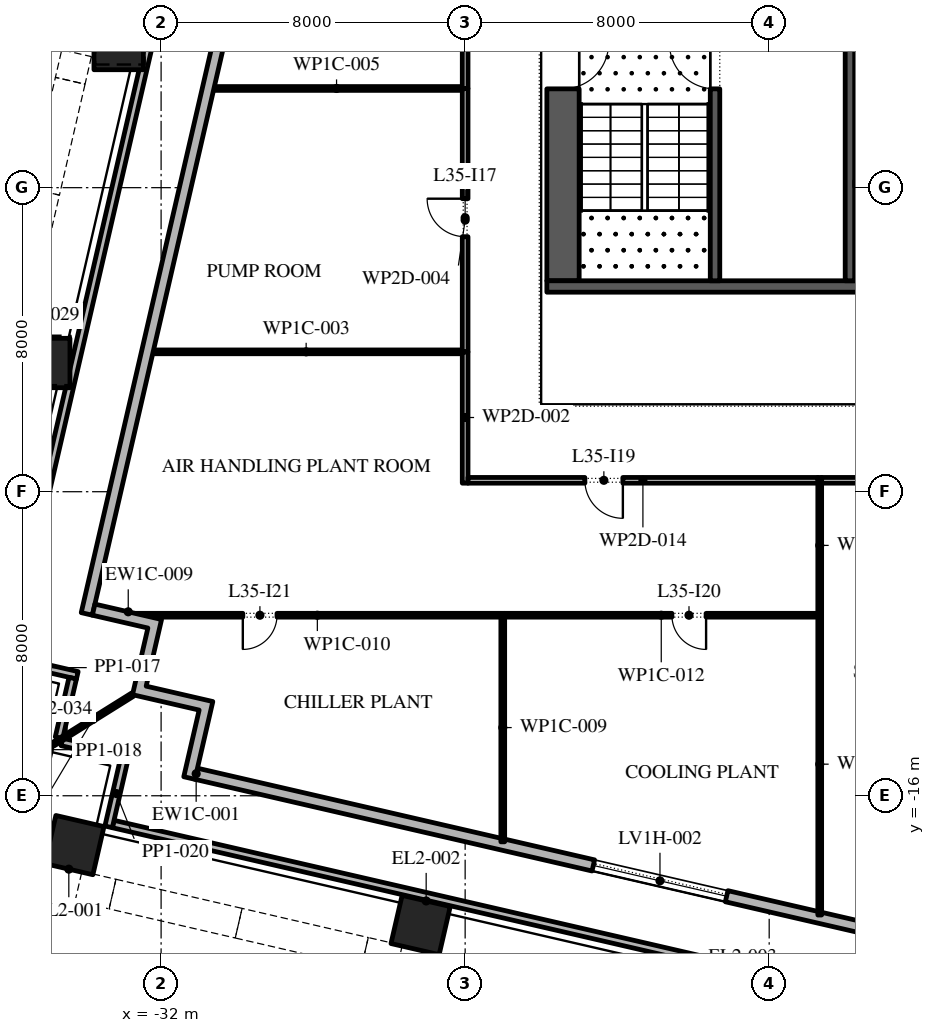
"""IFC4 building model, lengths in metres.
Left out: names, types, materials, properties, quantities, classifications, styles, units other than length and angle.
Written with IfcOpenShell. Run it as: python <this file> out.ifc"""

import sys

from ifc_helpers import new_model, si_unit, direction, frame, frame_2d, origin, origin_2d, place, context, subcontext, project, spatial, polyline, rectangle, outline, extrude, element, fill, save


model = new_model("IFC4")
c1 = context("Model", 3, precision=1e-05, world=origin(), true_north=direction((0.0, 1.0)))
c2 = subcontext(c1, "Body", "Model", "MODEL_VIEW")
j1 = project(units=[si_unit("LENGTHUNIT", "METRE"), si_unit("PLANEANGLEUNIT", "RADIAN")], contexts=[c1])
p1 = place(None, origin())
s1 = spatial("IfcSite", under=j1, at=p1, CompositionType="ELEMENT")
p2 = place(p1, origin())
s2 = spatial("IfcBuilding", under=s1, at=p2, CompositionType="ELEMENT")
p3 = place(p2, frame((0.0, 0.0, 160.2)))
s3 = spatial("IfcBuildingStorey", under=s2, at=p3, CompositionType="ELEMENT", Elevation=160.2)
for number, where, z_axis, x_axis in (
    (1, (-34.282, -17.298, 0.0), (0.0, 0.0, 1.0), (0.974, -0.225, 0.0)),
    (2, (-25.172, -19.402, 0.0), (0.0, 0.0, 1.0), (0.974, -0.225, 0.0)),
):
    element("IfcColumn", number, at=place(p3, frame(where, z_axis=z_axis, x_axis=x_axis)), inside=s3, PredefinedType="COLUMN", context=c2, shape_type="SweptSolid", body=[
        extrude(rectangle(XDim=1.3, YDim=1.3, at=origin_2d()), origin(), (0.0, 0.0, 1.0), 5.4),
    ])
p4 = place(p3, frame((-33.117, 3.753, 0.0), z_axis=(0.005830129404, 0.025263894082, 0.999663816114), x_axis=(-0.974391195695, 0.224859506699, 0.0)))
e3 = element("IfcColumn", 3, at=p4, inside=s3, PredefinedType="COLUMN", context=c2, shape_type="SweptSolid", body=[
    extrude(rectangle(XDim=1.3, YDim=1.3, at=origin_2d()), origin(), (0.0, 0.0, 1.0), 5.402),
])
p5 = place(p3, frame((-35.048, -4.614, 0.0), z_axis=(0.00293840192, 0.012657731347, 0.999915570251), x_axis=(-0.974097200243, 0.226129707199, 0.0)))
e4 = element("IfcColumn", 4, at=p5, inside=s3, PredefinedType="COLUMN", context=c2, shape_type="SweptSolid", body=[
    extrude(rectangle(XDim=1.3, YDim=1.3, at=origin_2d()), origin(), (0.0, 0.0, 1.0), 5.401),
])
p6 = place(p3, frame((-35.631, -15.139, 0.0), z_axis=(0.0, 0.0, 1.0), x_axis=(0.974370064785, -0.224951054344, 0.0)))
e5 = element("IfcColumn", 5, at=p6, inside=s3, PredefinedType="COLUMN", context=c2, shape_type="SweptSolid", body=[
    extrude(rectangle(XDim=1.3, YDim=1.3, at=origin_2d()), origin(), (0.0, 0.0, 1.0), 5.4),
])
p7 = place(p3, frame((-31.078, -15.421, 0.0), z_axis=(0.0, 0.0, 1.0), x_axis=(0.974370456532, -0.224949357493, 0.0)))
e6 = element("IfcWall", 6, at=p7, inside=s3, PredefinedType="STANDARD", context=c2, shape_type="SweptSolid", body=[
    extrude(rectangle(XDim=51.0, YDim=0.3, at=frame_2d((25.5, 0.0))), origin(), (0.0, 0.0, 1.0), 4.95),
])
p8 = place(p7, frame((10.725, 0.0, 0.6)))
e7 = element("IfcOpeningElement", 7, at=p8, cuts=e6, PredefinedType="OPENING", context=c2, shape_type="SweptSolid", body=[
    extrude(rectangle(XDim=3.6, YDim=3.25, at=frame_2d((1.8, 1.625))), frame((0.0, 0.16, 0.0), z_axis=(0.0, -1.0, 0.0), x_axis=(1.0, 0.0, 0.0)), (0.0, 0.0, 1.0), 0.32),
])
p9 = place(p7, frame((44.925, 0.0, 0.6)))
e8 = element("IfcOpeningElement", 8, at=p9, cuts=e6, PredefinedType="OPENING", context=c2, shape_type="SweptSolid", body=[
    extrude(rectangle(XDim=3.6, YDim=3.9, at=frame_2d((1.8, 1.95))), frame((0.0, 0.16, 0.0), z_axis=(0.0, -1.0, 0.0), x_axis=(1.0, 0.0, 0.0)), (0.0, 0.0, 1.0), 0.32),
])
p10 = place(p3, origin())
e9 = element("IfcWall", 9, at=p10, inside=s3, PredefinedType="STANDARD", context=c2, shape_type="SweptSolid", body=[
    extrude(outline(polyline([(-32.393, -13.116), (-30.639, -13.521), (-31.111, -15.567), (-31.404, -15.5), (-30.999, -13.746), (-32.753, -13.341), (-32.348, -11.587), (-33.809, -11.25), (-33.742, -10.957), (-31.988, -11.362), (-32.393, -13.116)])), origin(), (0.0, 0.0, 1.0), 4.95),
])
p11 = place(p3, frame((-33.261, -16.744, -0.05), z_axis=(0.0, 0.0, 1.0), x_axis=(0.974370602864, -0.224948723658, 0.0)))
e10 = element("IfcWall", 10, at=p11, inside=s3, PredefinedType="STANDARD", context=c2, shape_type="SweptSolid", body=[
    extrude(rectangle(XDim=54.56, YDim=0.2, at=frame_2d((27.28, 0.0))), origin(), (0.0, 0.0, 1.0), 1.1),
])
p12 = place(p3, frame((-22.904, 44.567, -0.05), z_axis=(0.0, 0.0, 1.0), x_axis=(-0.224953271822, -0.974369552837, 0.0)))
e11 = element("IfcWall", 11, at=p12, inside=s3, PredefinedType="STANDARD", context=c2, shape_type="SweptSolid", body=[
    extrude(rectangle(XDim=58.569, YDim=0.2, at=frame_2d((29.285, 0.0))), origin(), (0.0, 0.0, 1.0), 1.1),
])
p13 = place(p3, frame((-35.959, -12.426, -0.05), z_axis=(0.0, 0.0, 1.0), x_axis=(0.974356896201, -0.225008086135, 0.0)))
e12 = element("IfcWall", 12, at=p13, inside=s3, PredefinedType="STANDARD", context=c2, shape_type="SweptSolid", body=[
    extrude(rectangle(XDim=1.8, YDim=0.2, at=frame_2d((0.9, 0.0))), origin(), (0.0, 0.0, 1.0), 1.1),
])
p14 = place(p3, frame((-34.325, -12.906, -0.05), z_axis=(0.0, 0.0, 1.0), x_axis=(-0.224992557564, -0.974360482081, 0.0)))
e13 = element("IfcWall", 13, at=p14, inside=s3, PredefinedType="STANDARD", context=c2, shape_type="SweptSolid", body=[
    extrude(rectangle(XDim=1.608, YDim=0.2, at=frame_2d((0.804, 0.0))), origin(), (0.0, 0.0, 1.0), 1.1),
])
for number, where, z_axis, x_axis in (
    (14, (-34.61, -14.585, -0.05), (0.0, 0.0, 1.0), (0.974, -0.225, 0.0)),
    (15, (-32.976, -15.065, -0.05), (0.0, 0.0, 1.0), (-0.225, -0.974, 0.0)),
):
    element("IfcWall", number, at=place(p3, frame(where, z_axis=z_axis, x_axis=x_axis)), inside=s3, PredefinedType="STANDARD", context=c2, shape_type="SweptSolid", body=[
        extrude(rectangle(XDim=1.8, YDim=0.2, at=frame_2d((0.9, 0.0))), origin(), (0.0, 0.0, 1.0), 1.1),
    ])
p15 = place(p3, frame((-32.753, -13.341, -0.05), z_axis=(0.0, 0.0, 1.0), x_axis=(-0.848059759764, -0.529900598103, 0.0)))
e16 = element("IfcWall", 16, at=p15, inside=s3, PredefinedType="STANDARD", context=c2, shape_type="SweptSolid", body=[
    extrude(rectangle(XDim=2.455, YDim=0.1, at=frame_2d((1.228, 0.0))), origin(), (0.0, 0.0, 1.0), 5.0),
])
p16 = place(p3, frame((-21.425, -2.45, 0.0), z_axis=(0.0, 0.0, 1.0), x_axis=(0.0, 1.0, 0.0)))
e17 = element("IfcWall", 17, at=p16, inside=s3, PredefinedType="SHEAR", context=c2, shape_type="SweptSolid", body=[
    extrude(rectangle(XDim=27.9, YDim=0.85, at=frame_2d((13.95, 0.0))), origin(), (0.0, 0.0, 1.0), 4.95),
])
p17 = place(p16, frame((5.05, 0.0, 0.0)))
e18 = element("IfcOpeningElement", 18, at=p17, cuts=e17, PredefinedType="OPENING", context=c2, shape_type="SweptSolid", body=[
    extrude(rectangle(XDim=1.2, YDim=2.1, at=frame_2d((0.6, 1.05))), frame((0.0, 0.435, 0.0), z_axis=(0.0, -1.0, 0.0), x_axis=(1.0, 0.0, 0.0)), (0.0, 0.0, 1.0), 0.87),
])
p18 = place(p16, frame((21.65, 0.0, 0.0)))
e19 = element("IfcOpeningElement", 19, at=p18, cuts=e17, PredefinedType="OPENING", context=c2, shape_type="SweptSolid", body=[
    extrude(rectangle(XDim=1.2, YDim=2.1, at=frame_2d((0.6, 1.05))), frame((0.0, 0.435, 0.0), z_axis=(0.0, -1.0, 0.0), x_axis=(1.0, 0.0, 0.0)), (0.0, 0.0, 1.0), 0.87),
])
p19 = place(p3, frame((-21.85, -2.6, 0.0), z_axis=(0.0, 0.0, 1.0), x_axis=(1.0, 0.0, 0.0)))
e20 = element("IfcWall", 20, at=p19, inside=s3, PredefinedType="SHEAR", context=c2, shape_type="SweptSolid", body=[
    extrude(rectangle(XDim=11.7, YDim=0.3, at=frame_2d((5.85, 0.0))), origin(), (0.0, 0.0, 1.0), 4.95),
])
p20 = place(p3, frame((-17.425, -2.45, 0.0), z_axis=(0.0, 0.0, 1.0), x_axis=(0.0, 1.0, 0.0)))
e21 = element("IfcWall", 21, at=p20, inside=s3, PredefinedType="SHEAR", context=c2, shape_type="SweptSolid", body=[
    extrude(rectangle(XDim=6.3, YDim=0.25, at=frame_2d((3.15, 0.0))), origin(), (0.0, 0.0, 1.0), 4.95),
])
p21 = place(p20, frame((5.05, 0.0, 0.0)))
e22 = element("IfcOpeningElement", 22, at=p21, cuts=e21, PredefinedType="OPENING", context=c2, shape_type="SweptSolid", body=[
    extrude(rectangle(XDim=1.2, YDim=2.1, at=frame_2d((0.6, 1.05))), frame((0.0, 0.135, 0.0), z_axis=(0.0, -1.0, 0.0), x_axis=(1.0, 0.0, 0.0)), (0.0, 0.0, 1.0), 0.27),
])
p22 = place(p3, frame((-13.875, -2.45, 0.0), z_axis=(0.0, 0.0, 1.0), x_axis=(0.0, 1.0, 0.0)))
e23 = element("IfcWall", 23, at=p22, inside=s3, PredefinedType="SHEAR", context=c2, shape_type="SweptSolid", body=[
    extrude(rectangle(XDim=21.3, YDim=0.25, at=frame_2d((10.65, 0.0))), origin(), (0.0, 0.0, 1.0), 4.95),
])
p23 = place(p22, frame((9.946, 0.0, 0.0)))
e24 = element("IfcOpeningElement", 24, at=p23, cuts=e23, PredefinedType="OPENING", context=c2, shape_type="SweptSolid", body=[
    extrude(rectangle(XDim=1.8, YDim=2.4, at=frame_2d((0.9, 1.2))), frame((0.0, 0.135, 0.0), z_axis=(0.0, -1.0, 0.0), x_axis=(1.0, 0.0, 0.0)), (0.0, 0.0, 1.0), 0.27),
])
p24 = place(p22, frame((14.15, 0.0, 0.0)))
e25 = element("IfcOpeningElement", 25, at=p24, cuts=e23, PredefinedType="OPENING", context=c2, shape_type="SweptSolid", body=[
    extrude(rectangle(XDim=1.8, YDim=2.4, at=frame_2d((0.9, 1.2))), frame((0.0, 0.135, 0.0), z_axis=(0.0, -1.0, 0.0), x_axis=(1.0, 0.0, 0.0)), (0.0, 0.0, 1.0), 0.27),
])
p25 = place(p22, frame((18.325, 0.0, 0.0)))
e26 = element("IfcOpeningElement", 26, at=p25, cuts=e23, PredefinedType="OPENING", context=c2, shape_type="SweptSolid", body=[
    extrude(rectangle(XDim=1.8, YDim=2.4, at=frame_2d((0.9, 1.2))), frame((0.0, 0.135, 0.0), z_axis=(0.0, -1.0, 0.0), x_axis=(1.0, 0.0, 0.0)), (0.0, 0.0, 1.0), 0.27),
])
p26 = place(p22, frame((6.971, 0.0, 0.0)))
e27 = element("IfcOpeningElement", 27, at=p26, cuts=e23, PredefinedType="OPENING", context=c2, shape_type="SweptSolid", body=[
    extrude(rectangle(XDim=1.1, YDim=2.1, at=frame_2d((0.55, 1.05))), frame((0.0, 0.135, 0.0), z_axis=(0.0, -1.0, 0.0), x_axis=(1.0, 0.0, 0.0)), (0.0, 0.0, 1.0), 0.27),
])
p27 = place(p3, frame((-13.75, 0.1, 0.0), z_axis=(0.0, 0.0, 1.0), x_axis=(1.0, 0.0, 0.0)))
e28 = element("IfcWall", 28, at=p27, inside=s3, PredefinedType="PARTITIONING", context=c2, shape_type="SweptSolid", body=[
    extrude(rectangle(XDim=2.75, YDim=0.15, at=frame_2d((1.375, 0.0))), origin(), (0.0, 0.0, 1.0), 4.95),
])
p28 = place(p3, frame((-24.0, -7.775, 0.0), z_axis=(0.0, 0.0, 1.0), x_axis=(0.0, 1.0, 0.0)))
e29 = element("IfcWall", 29, at=p28, inside=s3, PredefinedType="PARTITIONING", context=c2, shape_type="SweptSolid", body=[
    extrude(rectangle(XDim=3.455, YDim=0.15, at=frame_2d((1.728, 0.0))), origin(), (0.0, 0.0, 1.0), 4.95),
])
p29 = place(p3, frame((-24.075, -4.32, 0.0), z_axis=(0.0, 0.0, 1.0), x_axis=(-1.0, 0.0, 0.0)))
e30 = element("IfcWall", 30, at=p29, inside=s3, PredefinedType="PARTITIONING", context=c2, shape_type="SweptSolid", body=[
    extrude(rectangle(XDim=8.217, YDim=0.1, at=frame_2d((4.108, 0.0))), origin(), (0.0, 0.0, 1.0), 4.95),
])
p30 = place(p3, frame((-24.0, -4.32, 0.0), z_axis=(0.0, 0.0, 1.0), x_axis=(0.0, 1.0, 0.0)))
e31 = element("IfcWall", 31, at=p30, inside=s3, PredefinedType="PARTITIONING", context=c2, shape_type="SweptSolid", body=[
    extrude(rectangle(XDim=6.93, YDim=0.15, at=frame_2d((3.465, 0.0))), origin(), (0.0, 0.0, 1.0), 4.95),
])
p31 = place(p30, frame((3.03, 0.0, 0.0)))
e32 = element("IfcOpeningElement", 32, at=p31, cuts=e31, PredefinedType="OPENING", context=c2, shape_type="SweptSolid", body=[
    extrude(rectangle(XDim=1.0, YDim=2.1, at=frame_2d((0.5, 1.05))), frame((0.0, 0.085, 0.0), z_axis=(0.0, -1.0, 0.0), x_axis=(1.0, 0.0, 0.0)), (0.0, 0.0, 1.0), 0.17),
])
p32 = place(p3, frame((-24.075, 2.61, 0.0), z_axis=(0.0, 0.0, 1.0), x_axis=(-1.0, 0.0, 0.0)))
e33 = element("IfcWall", 33, at=p32, inside=s3, PredefinedType="PARTITIONING", context=c2, shape_type="SweptSolid", body=[
    extrude(rectangle(XDim=6.617, YDim=0.1, at=frame_2d((3.309, 0.0))), origin(), (0.0, 0.0, 1.0), 4.95),
])
p33 = place(p3, frame((-24.0, 2.61, 0.0), z_axis=(0.0, 0.0, 1.0), x_axis=(0.0, 1.0, 0.0)))
e34 = element("IfcWall", 34, at=p33, inside=s3, PredefinedType="PARTITIONING", context=c2, shape_type="SweptSolid", body=[
    extrude(rectangle(XDim=21.715, YDim=0.15, at=frame_2d((10.857, 0.0))), origin(), (0.0, 0.0, 1.0), 4.95),
])
p34 = place(p33, frame((8.24, 0.0, 0.0)))
e35 = element("IfcOpeningElement", 35, at=p34, cuts=e34, PredefinedType="OPENING", context=c2, shape_type="SweptSolid", body=[
    extrude(rectangle(XDim=1.0, YDim=2.1, at=frame_2d((0.5, 1.05))), frame((0.0, 0.085, 0.0), z_axis=(0.0, -1.0, 0.0), x_axis=(1.0, 0.0, 0.0)), (0.0, 0.0, 1.0), 0.17),
])
p35 = place(p3, frame((-23.01, -17.212, 0.0), z_axis=(0.0, 0.0, 1.0), x_axis=(0.0, 1.0, 0.0)))
e36 = element("IfcWall", 36, at=p35, inside=s3, PredefinedType="PARTITIONING", context=c2, shape_type="SweptSolid", body=[
    extrude(rectangle(XDim=6.012, YDim=0.1, at=frame_2d((3.006, 0.0))), origin(), (0.0, 0.0, 1.0), 4.95),
])
p36 = place(p3, frame((-23.06, -11.25, 0.0), z_axis=(0.0, 0.0, 1.0), x_axis=(-1.0, 0.0, 0.0)))
e37 = element("IfcWall", 37, at=p36, inside=s3, PredefinedType="PARTITIONING", context=c2, shape_type="SweptSolid", body=[
    extrude(rectangle(XDim=9.658, YDim=0.1, at=frame_2d((4.829, 0.0))), origin(), (0.0, 0.0, 1.0), 4.95),
])
p37 = place(p36, frame((5.89, 0.0, 0.0)))
e38 = element("IfcOpeningElement", 38, at=p37, cuts=e37, PredefinedType="OPENING", context=c2, shape_type="SweptSolid", body=[
    extrude(rectangle(XDim=0.9, YDim=2.1, at=frame_2d((0.45, 1.05))), frame((0.0, 0.06, 0.0), z_axis=(0.0, -1.0, 0.0), x_axis=(1.0, 0.0, 0.0)), (0.0, 0.0, 1.0), 0.12),
])
p38 = place(p3, frame((-14.67, -19.138, 0.0), z_axis=(0.0, 0.0, 1.0), x_axis=(0.0, 1.0, 0.0)))
e39 = element("IfcWall", 39, at=p38, inside=s3, PredefinedType="PARTITIONING", context=c2, shape_type="SweptSolid", body=[
    extrude(rectangle(XDim=7.938, YDim=0.1, at=frame_2d((3.969, 0.0))), origin(), (0.0, 0.0, 1.0), 4.95),
])
p39 = place(p3, frame((-14.72, -11.25, 0.0), z_axis=(0.0, 0.0, 1.0), x_axis=(-1.0, 0.0, 0.0)))
e40 = element("IfcWall", 40, at=p39, inside=s3, PredefinedType="PARTITIONING", context=c2, shape_type="SweptSolid", body=[
    extrude(rectangle(XDim=8.24, YDim=0.1, at=frame_2d((4.12, 0.0))), origin(), (0.0, 0.0, 1.0), 4.95),
])
p40 = place(p39, frame((2.94, 0.0, 0.0)))
e41 = element("IfcOpeningElement", 41, at=p40, cuts=e40, PredefinedType="OPENING", context=c2, shape_type="SweptSolid", body=[
    extrude(rectangle(XDim=0.9, YDim=2.1, at=frame_2d((0.45, 1.05))), frame((0.0, 0.06, 0.0), z_axis=(0.0, -1.0, 0.0), x_axis=(1.0, 0.0, 0.0)), (0.0, 0.0, 1.0), 0.12),
])
p41 = place(p3, frame((-14.67, -11.2, 0.0), z_axis=(0.0, 0.0, 1.0), x_axis=(0.0, 1.0, 0.0)))
e42 = element("IfcWall", 42, at=p41, inside=s3, PredefinedType="PARTITIONING", context=c2, shape_type="SweptSolid", body=[
    extrude(rectangle(XDim=3.575, YDim=0.1, at=frame_2d((1.788, 0.0))), origin(), (0.0, 0.0, 1.0), 4.95),
])
p42 = place(p3, frame((-14.72, -7.7, 0.0), z_axis=(0.0, 0.0, 1.0), x_axis=(-1.0, 0.0, 0.0)))
e43 = element("IfcWall", 43, at=p42, inside=s3, PredefinedType="PARTITIONING", context=c2, shape_type="SweptSolid", body=[
    extrude(rectangle(XDim=9.205, YDim=0.15, at=frame_2d((4.603, 0.0))), origin(), (0.0, 0.0, 1.0), 4.95),
])
p43 = place(p42, frame((5.13, 0.0, 0.0)))
e44 = element("IfcOpeningElement", 44, at=p43, cuts=e43, PredefinedType="OPENING", context=c2, shape_type="SweptSolid", body=[
    extrude(rectangle(XDim=1.0, YDim=2.1, at=frame_2d((0.5, 1.05))), frame((0.0, 0.085, 0.0), z_axis=(0.0, -1.0, 0.0), x_axis=(1.0, 0.0, 0.0)), (0.0, 0.0, 1.0), 0.17),
])
p44 = place(p3, frame((-8.0, -7.7, 0.0), z_axis=(0.0, 0.0, 1.0), x_axis=(-1.0, 0.0, 0.0)))
e45 = element("IfcWall", 45, at=p44, inside=s3, PredefinedType="PARTITIONING", context=c2, shape_type="SweptSolid", body=[
    extrude(rectangle(XDim=6.62, YDim=0.15, at=frame_2d((3.31, 0.0))), origin(), (0.0, 0.0, 1.0), 4.95),
])
p45 = place(p44, frame((2.27, 0.0, 0.0)))
e46 = element("IfcOpeningElement", 46, at=p45, cuts=e45, PredefinedType="OPENING", context=c2, shape_type="SweptSolid", body=[
    extrude(rectangle(XDim=1.0, YDim=2.1, at=frame_2d((0.5, 1.05))), frame((0.0, 0.085, 0.0), z_axis=(0.0, -1.0, 0.0), x_axis=(1.0, 0.0, 0.0)), (0.0, 0.0, 1.0), 0.17),
])
p46 = place(p3, frame((-24.08, 31.562, 0.0), z_axis=(0.0, 0.0, 1.0), x_axis=(-0.224949667351, -0.974370384997, 0.0)))
e47 = element("IfcWall", 47, at=p46, inside=s3, PredefinedType="STANDARD", context=c2, shape_type="SweptSolid", body=[
    extrude(rectangle(XDim=43.903, YDim=0.3, at=frame_2d((21.952, 0.0))), origin(), (0.0, 0.0, 1.0), 4.95),
])
p47 = place(p46, frame((2.974, 0.0, 0.6)))
e48 = element("IfcOpeningElement", 48, at=p47, cuts=e47, PredefinedType="OPENING", context=c2, shape_type="SweptSolid", body=[
    extrude(rectangle(XDim=3.6, YDim=3.475, at=frame_2d((1.8, 1.738))), frame((0.0, 0.16, 0.0), z_axis=(0.0, -1.0, 0.0), x_axis=(1.0, 0.0, 0.0)), (0.0, 0.0, 1.0), 0.32),
])
p48 = place(p46, frame((10.089, 0.0, 0.6)))
e49 = element("IfcOpeningElement", 49, at=p48, cuts=e47, PredefinedType="OPENING", context=c2, shape_type="SweptSolid", body=[
    extrude(rectangle(XDim=3.6, YDim=3.625, at=frame_2d((1.8, 1.812))), frame((0.0, 0.16, 0.0), z_axis=(0.0, -1.0, 0.0), x_axis=(1.0, 0.0, 0.0)), (0.0, 0.0, 1.0), 0.32),
])
p49 = place(p46, frame((17.203, 0.0, 0.6)))
e50 = element("IfcOpeningElement", 50, at=p49, cuts=e47, PredefinedType="OPENING", context=c2, shape_type="SweptSolid", body=[
    extrude(rectangle(XDim=3.6, YDim=3.9, at=frame_2d((1.8, 1.95))), frame((0.0, 0.16, 0.0), z_axis=(0.0, -1.0, 0.0), x_axis=(1.0, 0.0, 0.0)), (0.0, 0.0, 1.0), 0.32),
])
p50 = place(p8, origin())
e51 = element("IfcWindow", 51, at=p50, inside=s3, PartitioningType="DOUBLE_PANEL_HORIZONTAL", PredefinedType="WINDOW", context=c2, shape_type="SweptSolid", body=[
    extrude(rectangle(XDim=3.6, YDim=3.25, at=frame_2d((1.8, 1.625))), frame((0.0, 0.03, 0.0), z_axis=(0.0, -1.0, 0.0), x_axis=(1.0, 0.0, 0.0)), (0.0, 0.0, 1.0), 0.06),
])
fill(e7, e51)
p51 = place(p21, origin())
e52 = element("IfcDoor", 52, at=p51, inside=s3, OperationType="SINGLE_SWING_LEFT", PredefinedType="DOOR", context=c2, shape_type="SweptSolid", body=[
    extrude(rectangle(XDim=1.2, YDim=2.1, at=frame_2d((0.6, 1.05))), frame((0.0, 0.025, 0.0), z_axis=(0.0, -1.0, 0.0), x_axis=(1.0, 0.0, 0.0)), (0.0, 0.0, 1.0), 0.05),
])
fill(e22, e52)
p52 = place(p17, frame((1.2, 0.0, 0.0), z_axis=(0.0, 0.0, 1.0), x_axis=(-1.0, 0.0, 0.0)))
e53 = element("IfcDoor", 53, at=p52, inside=s3, OperationType="SINGLE_SWING_RIGHT", PredefinedType="DOOR", context=c2, shape_type="SweptSolid", body=[
    extrude(rectangle(XDim=1.2, YDim=2.1, at=frame_2d((0.6, 1.05))), frame((0.0, 0.025, 0.0), z_axis=(0.0, -1.0, 0.0), x_axis=(1.0, 0.0, 0.0)), (0.0, 0.0, 1.0), 0.05),
])
fill(e18, e53)
p53 = place(p31, origin())
e54 = element("IfcDoor", 54, at=p53, inside=s3, OperationType="SINGLE_SWING_LEFT", PredefinedType="DOOR", context=c2, shape_type="SweptSolid", body=[
    extrude(rectangle(XDim=1.0, YDim=2.1, at=frame_2d((0.5, 1.05))), frame((0.0, 0.025, 0.0), z_axis=(0.0, -1.0, 0.0), x_axis=(1.0, 0.0, 0.0)), (0.0, 0.0, 1.0), 0.05),
])
fill(e32, e54)
p54 = place(p43, origin())
e55 = element("IfcDoor", 55, at=p54, inside=s3, OperationType="SINGLE_SWING_RIGHT", PredefinedType="DOOR", context=c2, shape_type="SweptSolid", body=[
    extrude(rectangle(XDim=1.0, YDim=2.1, at=frame_2d((0.5, 1.05))), frame((0.0, 0.025, 0.0), z_axis=(0.0, -1.0, 0.0), x_axis=(1.0, 0.0, 0.0)), (0.0, 0.0, 1.0), 0.05),
])
fill(e44, e55)
p55 = place(p40, origin())
e56 = element("IfcDoor", 56, at=p55, inside=s3, OperationType="SINGLE_SWING_RIGHT", PredefinedType="DOOR", context=c2, shape_type="SweptSolid", body=[
    extrude(rectangle(XDim=0.9, YDim=2.1, at=frame_2d((0.45, 1.05))), frame((0.0, 0.025, 0.0), z_axis=(0.0, -1.0, 0.0), x_axis=(1.0, 0.0, 0.0)), (0.0, 0.0, 1.0), 0.05),
])
fill(e41, e56)
p56 = place(p37, origin())
e57 = element("IfcDoor", 57, at=p56, inside=s3, OperationType="SINGLE_SWING_LEFT", PredefinedType="DOOR", context=c2, shape_type="SweptSolid", body=[
    extrude(rectangle(XDim=0.9, YDim=2.1, at=frame_2d((0.45, 1.05))), frame((0.0, 0.025, 0.0), z_axis=(0.0, -1.0, 0.0), x_axis=(1.0, 0.0, 0.0)), (0.0, 0.0, 1.0), 0.05),
])
fill(e38, e57)
save(model, sys.argv[1])
